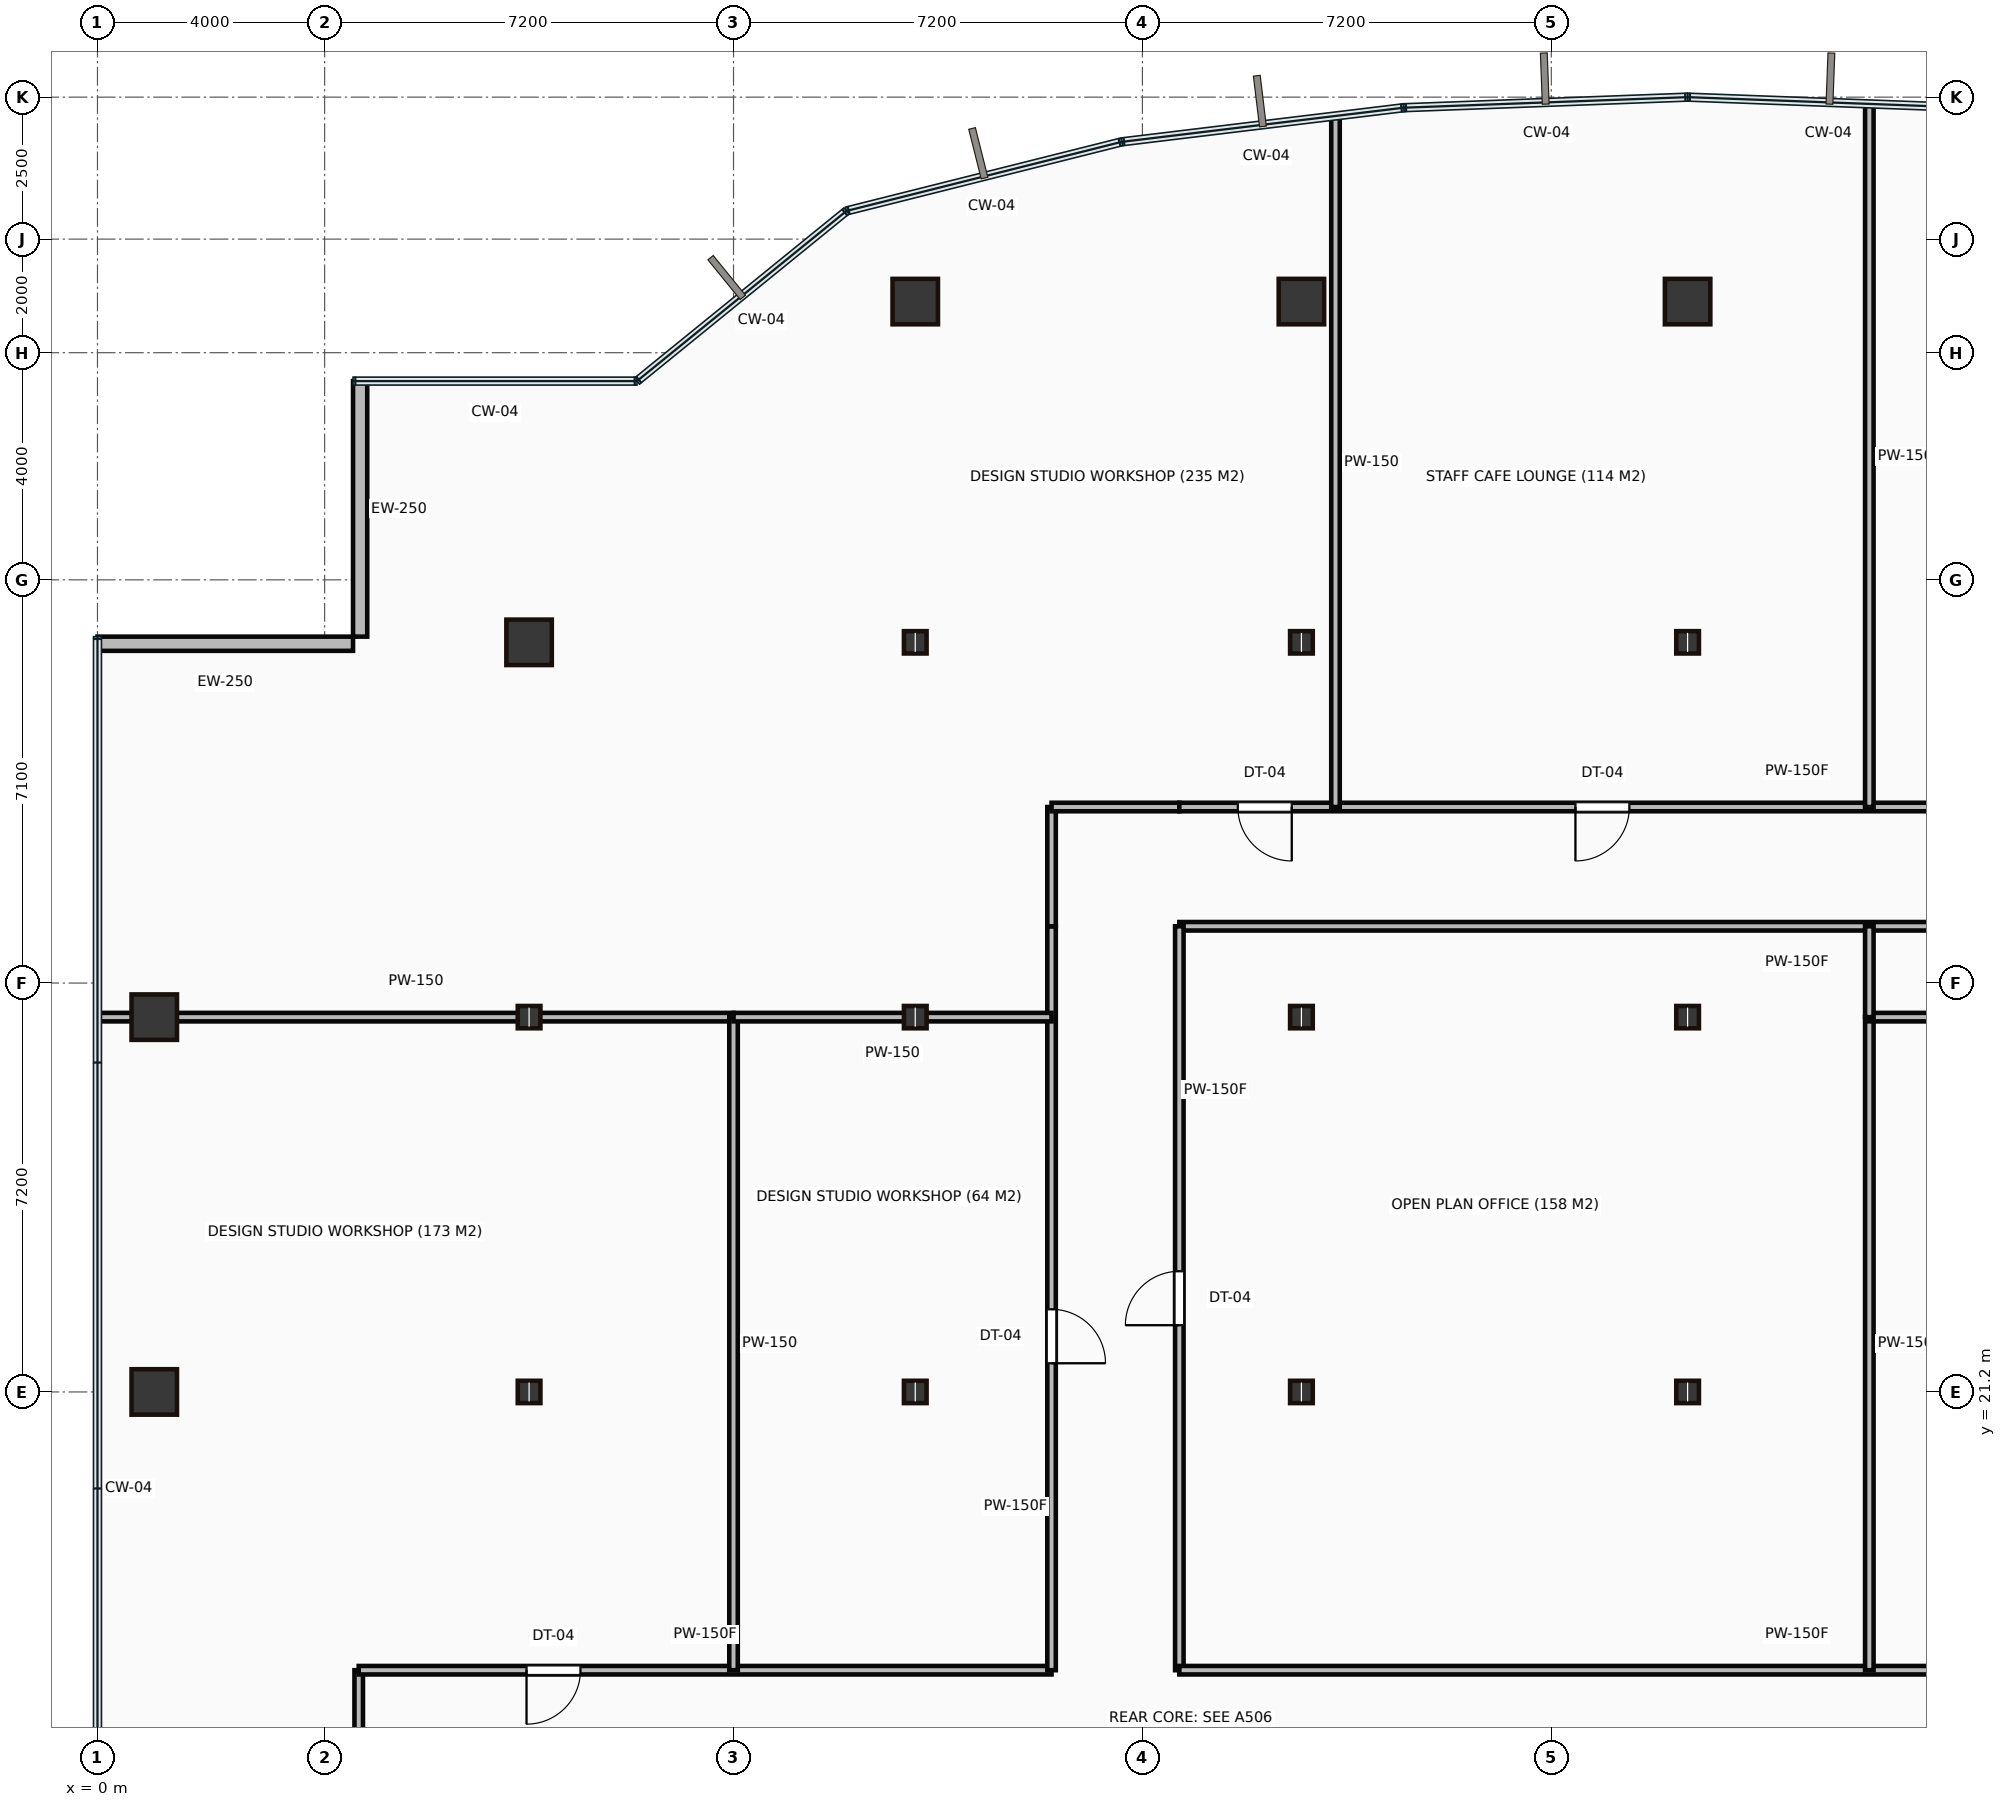
"""IFC4 building model, lengths in metres.
Left out: names, types, materials, properties, quantities, classifications, styles, units other than length and angle.
Written with IfcOpenShell. Run it as: python <this file> out.ifc"""

import sys

from ifc_helpers import new_model, si_unit, direction, frame, frame_2d, origin, origin_2d, place, context, subcontext, project, spatial, rectangle, hollow_rectangle, i_section, extrude, source, transform, mapped, element, fill, save


model = new_model("IFC4")
c1 = context("Model", 3, precision=1e-05, world=origin(), true_north=direction((0.0, 1.0)))
c2 = subcontext(c1, "Body", "Model", "MODEL_VIEW")
j1 = project(units=[si_unit("LENGTHUNIT", "METRE"), si_unit("PLANEANGLEUNIT", "RADIAN")], contexts=[c1])
p1 = place(None, origin())
s1 = spatial("IfcSite", under=j1, at=p1, CompositionType="ELEMENT")
p2 = place(p1, origin())
s2 = spatial("IfcBuilding", under=s1, at=p2, CompositionType="ELEMENT")
p3 = place(p2, frame((0.0, 0.0, 128.8)))
s3 = spatial("IfcBuildingStorey", under=s2, at=p3, CompositionType="ELEMENT", Elevation=128.8)
m1 = source(origin(), c2, "Body", "SweptSolid", [
    extrude(hollow_rectangle(XDim=0.8, YDim=0.8, WallThickness=0.04, at=origin_2d()), origin(), (0.0, 0.0, 1.0), 3.65),
])
for number, where, z_axis, x_axis in (
    (1, (1.0, 21.2, 0.0), (0.0, 0.0, 1.0), (1.0, 0.0, 0.0)),
    (2, (1.0, 27.8, 0.0), (0.0, 0.0, 1.0), (1.0, 0.0, 0.0)),
):
    element("IfcColumn", number, at=place(p3, frame(where, z_axis=z_axis, x_axis=x_axis)), inside=s3, PredefinedType="COLUMN", context=c2, shape_type="MappedRepresentation", body=[
        mapped(m1, transform((0.0, 0.0, 0.0))),
    ])
m2 = source(origin(), c2, "Body", "SweptSolid", [
    extrude(i_section(OverallWidth=0.399, OverallDepth=0.393, WebThickness=0.023, FlangeThickness=0.037, at=origin_2d()), origin(), (0.0, 0.0, 1.0), 3.65),
])
for number, where, z_axis, x_axis in (
    (3, (7.6, 21.2, 0.0), (0.0, 0.0, 1.0), (1.0, 0.0, 0.0)),
    (4, (7.6, 27.8, 0.0), (0.0, 0.0, 1.0), (1.0, 0.0, 0.0)),
):
    element("IfcColumn", number, at=place(p3, frame(where, z_axis=z_axis, x_axis=x_axis)), inside=s3, PredefinedType="COLUMN", context=c2, shape_type="MappedRepresentation", body=[
        mapped(m2, transform((0.0, 0.0, 0.0))),
    ])
p4 = place(p3, frame((7.6, 34.4, 0.0), z_axis=(0.0, 0.0, 1.0), x_axis=(1.0, 0.0, 0.0)))
e5 = element("IfcColumn", 5, at=p4, inside=s3, PredefinedType="COLUMN", context=c2, shape_type="MappedRepresentation", body=[
    mapped(m1, transform((0.0, 0.0, 0.0))),
])
for number, where, z_axis, x_axis in (
    (6, (14.4, 21.2, 0.0), (0.0, 0.0, 1.0), (1.0, 0.0, 0.0)),
    (7, (14.4, 27.8, 0.0), (0.0, 0.0, 1.0), (1.0, 0.0, 0.0)),
    (8, (14.4, 34.4, 0.0), (0.0, 0.0, 1.0), (1.0, 0.0, 0.0)),
):
    element("IfcColumn", number, at=place(p3, frame(where, z_axis=z_axis, x_axis=x_axis)), inside=s3, PredefinedType="COLUMN", context=c2, shape_type="MappedRepresentation", body=[
        mapped(m2, transform((0.0, 0.0, 0.0))),
    ])
p5 = place(p3, frame((14.4, 40.4, 0.0), z_axis=(0.0, 0.0, 1.0), x_axis=(1.0, 0.0, 0.0)))
e9 = element("IfcColumn", 9, at=p5, inside=s3, PredefinedType="COLUMN", context=c2, shape_type="MappedRepresentation", body=[
    mapped(m1, transform((0.0, 0.0, 0.0))),
])
for number, where, z_axis, x_axis in (
    (10, (21.2, 21.2, 0.0), (0.0, 0.0, 1.0), (1.0, 0.0, 0.0)),
    (11, (21.2, 27.8, 0.0), (0.0, 0.0, 1.0), (1.0, 0.0, 0.0)),
    (12, (21.2, 34.4, 0.0), (0.0, 0.0, 1.0), (1.0, 0.0, 0.0)),
):
    element("IfcColumn", number, at=place(p3, frame(where, z_axis=z_axis, x_axis=x_axis)), inside=s3, PredefinedType="COLUMN", context=c2, shape_type="MappedRepresentation", body=[
        mapped(m2, transform((0.0, 0.0, 0.0))),
    ])
p6 = place(p3, frame((21.2, 40.4, 0.0), z_axis=(0.0, 0.0, 1.0), x_axis=(1.0, 0.0, 0.0)))
e13 = element("IfcColumn", 13, at=p6, inside=s3, PredefinedType="COLUMN", context=c2, shape_type="MappedRepresentation", body=[
    mapped(m1, transform((0.0, 0.0, 0.0))),
])
for number, where, z_axis, x_axis in (
    (14, (28.0, 21.2, 0.0), (0.0, 0.0, 1.0), (1.0, 0.0, 0.0)),
    (15, (28.0, 27.8, 0.0), (0.0, 0.0, 1.0), (1.0, 0.0, 0.0)),
    (16, (28.0, 34.4, 0.0), (0.0, 0.0, 1.0), (1.0, 0.0, 0.0)),
):
    element("IfcColumn", number, at=place(p3, frame(where, z_axis=z_axis, x_axis=x_axis)), inside=s3, PredefinedType="COLUMN", context=c2, shape_type="MappedRepresentation", body=[
        mapped(m2, transform((0.0, 0.0, 0.0))),
    ])
p7 = place(p3, frame((28.0, 40.4, 0.0), z_axis=(0.0, 0.0, 1.0), x_axis=(1.0, 0.0, 0.0)))
e17 = element("IfcColumn", 17, at=p7, inside=s3, PredefinedType="COLUMN", context=c2, shape_type="MappedRepresentation", body=[
    mapped(m1, transform((0.0, 0.0, 0.0))),
])
m3 = source(origin(), c2, "Body", "SweptSolid", [
    extrude(rectangle(XDim=4.5, YDim=0.25, at=frame_2d((2.25, 0.0))), origin(), (0.0, 0.0, 1.0), 3.4),
])
for number, where, z_axis, x_axis in (
    (18, (4.625, 39.0, 0.0), (0.0, 0.0, 1.0), (0.0, -1.0, 0.0)),
    (19, (4.5, 34.375, 0.0), (0.0, 0.0, 1.0), (-1.0, 0.0, 0.0)),
):
    element("IfcWall", number, at=place(p3, frame(where, z_axis=z_axis, x_axis=x_axis)), inside=s3, PredefinedType="STANDARD", context=c2, shape_type="MappedRepresentation", body=[
        mapped(m3, transform((0.0, 0.0, 0.0))),
    ])
m4 = source(origin(), c2, "Body", "SweptSolid", [
    extrude(rectangle(XDim=2.22, YDim=0.15, at=frame_2d((1.11, 0.0))), origin(), (0.0, 0.0, 1.0), 3.4),
])
p8 = place(p3, frame((4.6, 14.08, 0.0), z_axis=(0.0, 0.0, 1.0), x_axis=(0.0, 1.0, 0.0)))
e20 = element("IfcWall", 20, at=p8, inside=s3, PredefinedType="PARTITIONING", context=c2, shape_type="MappedRepresentation", body=[
    mapped(m4, transform((0.0, 0.0, 0.0))),
])
m5 = source(origin(), c2, "Body", "SweptSolid", [
    extrude(rectangle(XDim=12.2, YDim=0.15, at=frame_2d((6.1, 0.0))), origin(), (0.0, 0.0, 1.0), 3.4),
])
p9 = place(p3, frame((4.6, 16.3, 0.0), z_axis=(0.0, 0.0, 1.0), x_axis=(1.0, 0.0, 0.0)))
e21 = element("IfcWall", 21, at=p9, inside=s3, PredefinedType="PARTITIONING", context=c2, shape_type="MappedRepresentation", body=[
    mapped(m5, transform((0.0, 0.0, 0.0))),
])
p10 = place(p9, frame((2.955, 0.0, 0.0)))
e22 = element("IfcOpeningElement", 22, at=p10, cuts=e21, PredefinedType="OPENING", context=c2, shape_type="SweptSolid", body=[
    extrude(rectangle(XDim=0.95, YDim=2.15, at=frame_2d((0.475, 1.075))), frame((0.0, 0.085, 0.0), z_axis=(0.0, -1.0, 0.0), x_axis=(1.0, 0.0, 0.0)), (0.0, 0.0, 1.0), 0.17),
])
m6 = source(origin(), c2, "Body", "SweptSolid", [
    extrude(rectangle(XDim=13.1, YDim=0.15, at=frame_2d((6.55, 0.0))), origin(), (0.0, 0.0, 1.0), 3.4),
])
p11 = place(p3, frame((16.8, 16.3, 0.0), z_axis=(0.0, 0.0, 1.0), x_axis=(0.0, 1.0, 0.0)))
e23 = element("IfcWall", 23, at=p11, inside=s3, PredefinedType="PARTITIONING", context=c2, shape_type="MappedRepresentation", body=[
    mapped(m6, transform((0.0, 0.0, 0.0))),
])
p12 = place(p11, frame((5.405, 0.0, 0.0)))
e24 = element("IfcOpeningElement", 24, at=p12, cuts=e23, PredefinedType="OPENING", context=c2, shape_type="SweptSolid", body=[
    extrude(rectangle(XDim=0.95, YDim=2.15, at=frame_2d((0.475, 1.075))), frame((0.0, 0.085, 0.0), z_axis=(0.0, -1.0, 0.0), x_axis=(1.0, 0.0, 0.0)), (0.0, 0.0, 1.0), 0.17),
])
m7 = source(origin(), c2, "Body", "SweptSolid", [
    extrude(rectangle(XDim=2.1, YDim=0.15, at=frame_2d((1.05, 0.0))), origin(), (0.0, 0.0, 1.0), 3.4),
])
p13 = place(p3, frame((16.8, 29.4, 0.0), z_axis=(0.0, 0.0, 1.0), x_axis=(0.0, 1.0, 0.0)))
e25 = element("IfcWall", 25, at=p13, inside=s3, PredefinedType="PARTITIONING", context=c2, shape_type="MappedRepresentation", body=[
    mapped(m7, transform((0.0, 0.0, 0.0))),
])
m8 = source(origin(), c2, "Body", "SweptSolid", [
    extrude(rectangle(XDim=2.25, YDim=0.15, at=frame_2d((1.125, 0.0))), origin(), (0.0, 0.0, 1.0), 3.4),
])
p14 = place(p3, frame((16.8, 31.5, 0.0), z_axis=(0.0, 0.0, 1.0), x_axis=(1.0, 0.0, 0.0)))
e26 = element("IfcWall", 26, at=p14, inside=s3, PredefinedType="PARTITIONING", context=c2, shape_type="MappedRepresentation", body=[
    mapped(m8, transform((0.0, 0.0, 0.0))),
])
m9 = source(origin(), c2, "Body", "SweptSolid", [
    extrude(rectangle(XDim=21.75, YDim=0.15, at=frame_2d((10.875, 0.0))), origin(), (0.0, 0.0, 1.0), 3.4),
])
p15 = place(p3, frame((19.05, 31.5, 0.0), z_axis=(0.0, 0.0, 1.0), x_axis=(1.0, 0.0, 0.0)))
e27 = element("IfcWall", 27, at=p15, inside=s3, PredefinedType="PARTITIONING", context=c2, shape_type="MappedRepresentation", body=[
    mapped(m9, transform((0.0, 0.0, 0.0))),
])
p16 = place(p15, frame((1.03, 0.0, 0.0)))
e28 = element("IfcOpeningElement", 28, at=p16, cuts=e27, PredefinedType="OPENING", context=c2, shape_type="SweptSolid", body=[
    extrude(rectangle(XDim=0.95, YDim=2.15, at=frame_2d((0.475, 1.075))), frame((0.0, 0.085, 0.0), z_axis=(0.0, -1.0, 0.0), x_axis=(1.0, 0.0, 0.0)), (0.0, 0.0, 1.0), 0.17),
])
p17 = place(p15, frame((6.975, 0.0, 0.0)))
e29 = element("IfcOpeningElement", 29, at=p17, cuts=e27, PredefinedType="OPENING", context=c2, shape_type="SweptSolid", body=[
    extrude(rectangle(XDim=0.95, YDim=2.15, at=frame_2d((0.475, 1.075))), frame((0.0, 0.085, 0.0), z_axis=(0.0, -1.0, 0.0), x_axis=(1.0, 0.0, 0.0)), (0.0, 0.0, 1.0), 0.17),
])
p18 = place(p15, frame((16.345, 0.0, 0.0)))
e30 = element("IfcOpeningElement", 30, at=p18, cuts=e27, PredefinedType="OPENING", context=c2, shape_type="SweptSolid", body=[
    extrude(rectangle(XDim=0.95, YDim=2.15, at=frame_2d((0.475, 1.075))), frame((0.0, 0.085, 0.0), z_axis=(0.0, -1.0, 0.0), x_axis=(1.0, 0.0, 0.0)), (0.0, 0.0, 1.0), 0.17),
])
p19 = place(p3, frame((40.8, 29.4, 0.0), z_axis=(0.0, 0.0, 1.0), x_axis=(-1.0, 0.0, 0.0)))
e31 = element("IfcWall", 31, at=p19, inside=s3, PredefinedType="PARTITIONING", context=c2, shape_type="MappedRepresentation", body=[
    mapped(m9, transform((0.0, 0.0, 0.0))),
])
p20 = place(p3, frame((19.05, 29.4, 0.0), z_axis=(0.0, 0.0, 1.0), x_axis=(0.0, -1.0, 0.0)))
e32 = element("IfcWall", 32, at=p20, inside=s3, PredefinedType="PARTITIONING", context=c2, shape_type="MappedRepresentation", body=[
    mapped(m6, transform((0.0, 0.0, 0.0))),
])
p21 = place(p20, frame((6.075, 0.0, 0.0)))
e33 = element("IfcOpeningElement", 33, at=p21, cuts=e32, PredefinedType="OPENING", context=c2, shape_type="SweptSolid", body=[
    extrude(rectangle(XDim=0.95, YDim=2.15, at=frame_2d((0.475, 1.075))), frame((0.0, 0.085, 0.0), z_axis=(0.0, -1.0, 0.0), x_axis=(1.0, 0.0, 0.0)), (0.0, 0.0, 1.0), 0.17),
])
p22 = place(p3, frame((19.05, 16.3, 0.0), z_axis=(0.0, 0.0, 1.0), x_axis=(1.0, 0.0, 0.0)))
e34 = element("IfcWall", 34, at=p22, inside=s3, PredefinedType="PARTITIONING", context=c2, shape_type="MappedRepresentation", body=[
    mapped(m9, transform((0.0, 0.0, 0.0))),
])
p23 = place(p22, frame((16.345, 0.0, 0.0)))
e35 = element("IfcOpeningElement", 35, at=p23, cuts=e34, PredefinedType="OPENING", context=c2, shape_type="SweptSolid", body=[
    extrude(rectangle(XDim=0.95, YDim=2.15, at=frame_2d((0.475, 1.075))), frame((0.0, 0.085, 0.0), z_axis=(0.0, -1.0, 0.0), x_axis=(1.0, 0.0, 0.0)), (0.0, 0.0, 1.0), 0.17),
])
m10 = source(origin(), c2, "Body", "SweptSolid", [
    extrude(rectangle(XDim=11.18, YDim=0.15, at=frame_2d((5.59, 0.0))), origin(), (0.0, 0.0, 1.0), 2.702),
])
p24 = place(p3, frame((0.02, 27.8, 0.0), z_axis=(0.0, 0.0, 1.0), x_axis=(1.0, 0.0, 0.0)))
e36 = element("IfcWall", 36, at=p24, inside=s3, PredefinedType="PARTITIONING", context=c2, shape_type="MappedRepresentation", body=[
    mapped(m10, transform((0.0, 0.0, 0.0))),
])
m11 = source(origin(), c2, "Body", "SweptSolid", [
    extrude(rectangle(XDim=11.5, YDim=0.15, at=frame_2d((5.75, 0.0))), origin(), (0.0, 0.0, 1.0), 3.4),
])
p25 = place(p3, frame((11.2, 27.8, 0.0), z_axis=(0.0, 0.0, 1.0), x_axis=(0.0, -1.0, 0.0)))
e37 = element("IfcWall", 37, at=p25, inside=s3, PredefinedType="PARTITIONING", context=c2, shape_type="MappedRepresentation", body=[
    mapped(m11, transform((0.0, 0.0, 0.0))),
])
m12 = source(origin(), c2, "Body", "SweptSolid", [
    extrude(rectangle(XDim=5.6, YDim=0.15, at=frame_2d((2.8, 0.0))), origin(), (0.0, 0.0, 1.0), 2.702),
])
p26 = place(p3, frame((16.8, 27.8, 0.0), z_axis=(0.0, 0.0, 1.0), x_axis=(-1.0, 0.0, 0.0)))
e38 = element("IfcWall", 38, at=p26, inside=s3, PredefinedType="PARTITIONING", context=c2, shape_type="MappedRepresentation", body=[
    mapped(m12, transform((0.0, 0.0, 0.0))),
])
m13 = source(origin(), c2, "Body", "SweptSolid", [
    extrude(rectangle(XDim=12.148, YDim=0.15, at=frame_2d((6.074, 0.0))), origin(), (0.0, 0.0, 1.0), 3.4),
])
p27 = place(p3, frame((21.8, 43.648, 0.0), z_axis=(0.0, 0.0, 1.0), x_axis=(0.0, -1.0, 0.0)))
e39 = element("IfcWall", 39, at=p27, inside=s3, PredefinedType="PARTITIONING", context=c2, shape_type="MappedRepresentation", body=[
    mapped(m13, transform((0.0, 0.0, 0.0))),
])
p28 = place(p3, frame((31.2, 27.8, 0.0), z_axis=(0.0, 0.0, 1.0), x_axis=(0.0, -1.0, 0.0)))
e40 = element("IfcWall", 40, at=p28, inside=s3, PredefinedType="PARTITIONING", context=c2, shape_type="MappedRepresentation", body=[
    mapped(m11, transform((0.0, 0.0, 0.0))),
])
m14 = source(origin(), c2, "Body", "SweptSolid", [
    extrude(rectangle(XDim=10.3, YDim=0.15, at=frame_2d((5.15, 0.0))), origin(), (0.0, 0.0, 1.0), 2.702),
])
p29 = place(p3, frame((41.5, 27.8, 0.0), z_axis=(0.0, 0.0, 1.0), x_axis=(-1.0, 0.0, 0.0)))
e41 = element("IfcWall", 41, at=p29, inside=s3, PredefinedType="PARTITIONING", context=c2, shape_type="MappedRepresentation", body=[
    mapped(m14, transform((0.0, 0.0, 0.0))),
])
m15 = source(origin(), c2, "Body", "SweptSolid", [
    extrude(rectangle(XDim=1.6, YDim=0.15, at=frame_2d((0.8, 0.0))), origin(), (0.0, 0.0, 1.0), 3.4),
])
p30 = place(p3, frame((31.2, 29.4, 0.0), z_axis=(0.0, 0.0, 1.0), x_axis=(0.0, -1.0, 0.0)))
e42 = element("IfcWall", 42, at=p30, inside=s3, PredefinedType="PARTITIONING", context=c2, shape_type="MappedRepresentation", body=[
    mapped(m15, transform((0.0, 0.0, 0.0))),
])
m16 = source(origin(), c2, "Body", "SweptSolid", [
    extrude(rectangle(XDim=12.361, YDim=0.15, at=frame_2d((6.18, 0.0))), origin(), (0.0, 0.0, 1.0), 3.4),
])
p31 = place(p3, frame((31.2, 43.861, 0.0), z_axis=(0.0, 0.0, 1.0), x_axis=(0.0, -1.0, 0.0)))
e43 = element("IfcWall", 43, at=p31, inside=s3, PredefinedType="PARTITIONING", context=c2, shape_type="MappedRepresentation", body=[
    mapped(m16, transform((0.0, 0.0, 0.0))),
])
m17 = source(origin(), c2, "Body", "SweptSolid", [
    extrude(rectangle(XDim=0.95, YDim=2.15, at=frame_2d((0.475, 1.075))), frame((0.0, 0.025, 0.0), z_axis=(0.0, -1.0, 0.0), x_axis=(1.0, 0.0, 0.0)), (0.0, 0.0, 1.0), 0.05),
])
p32 = place(p10, origin())
e44 = element("IfcDoor", 44, at=p32, inside=s3, OperationType="SINGLE_SWING_LEFT", PredefinedType="DOOR", context=c2, shape_type="MappedRepresentation", body=[
    mapped(m17, transform((0.0, 0.0, 0.0))),
])
fill(e22, e44)
p33 = place(p16, origin())
e45 = element("IfcDoor", 45, at=p33, inside=s3, OperationType="SINGLE_SWING_RIGHT", PredefinedType="DOOR", context=c2, shape_type="MappedRepresentation", body=[
    mapped(m17, transform((0.0, 0.0, 0.0))),
])
fill(e28, e45)
p34 = place(p12, origin())
e46 = element("IfcDoor", 46, at=p34, inside=s3, OperationType="SINGLE_SWING_LEFT", PredefinedType="DOOR", context=c2, shape_type="MappedRepresentation", body=[
    mapped(m17, transform((0.0, 0.0, 0.0))),
])
fill(e24, e46)
p35 = place(p21, origin())
e47 = element("IfcDoor", 47, at=p35, inside=s3, OperationType="SINGLE_SWING_RIGHT", PredefinedType="DOOR", context=c2, shape_type="MappedRepresentation", body=[
    mapped(m17, transform((0.0, 0.0, 0.0))),
])
fill(e33, e47)
p36 = place(p17, origin())
e48 = element("IfcDoor", 48, at=p36, inside=s3, OperationType="SINGLE_SWING_LEFT", PredefinedType="DOOR", context=c2, shape_type="MappedRepresentation", body=[
    mapped(m17, transform((0.0, 0.0, 0.0))),
])
fill(e29, e48)
save(model, sys.argv[1])
